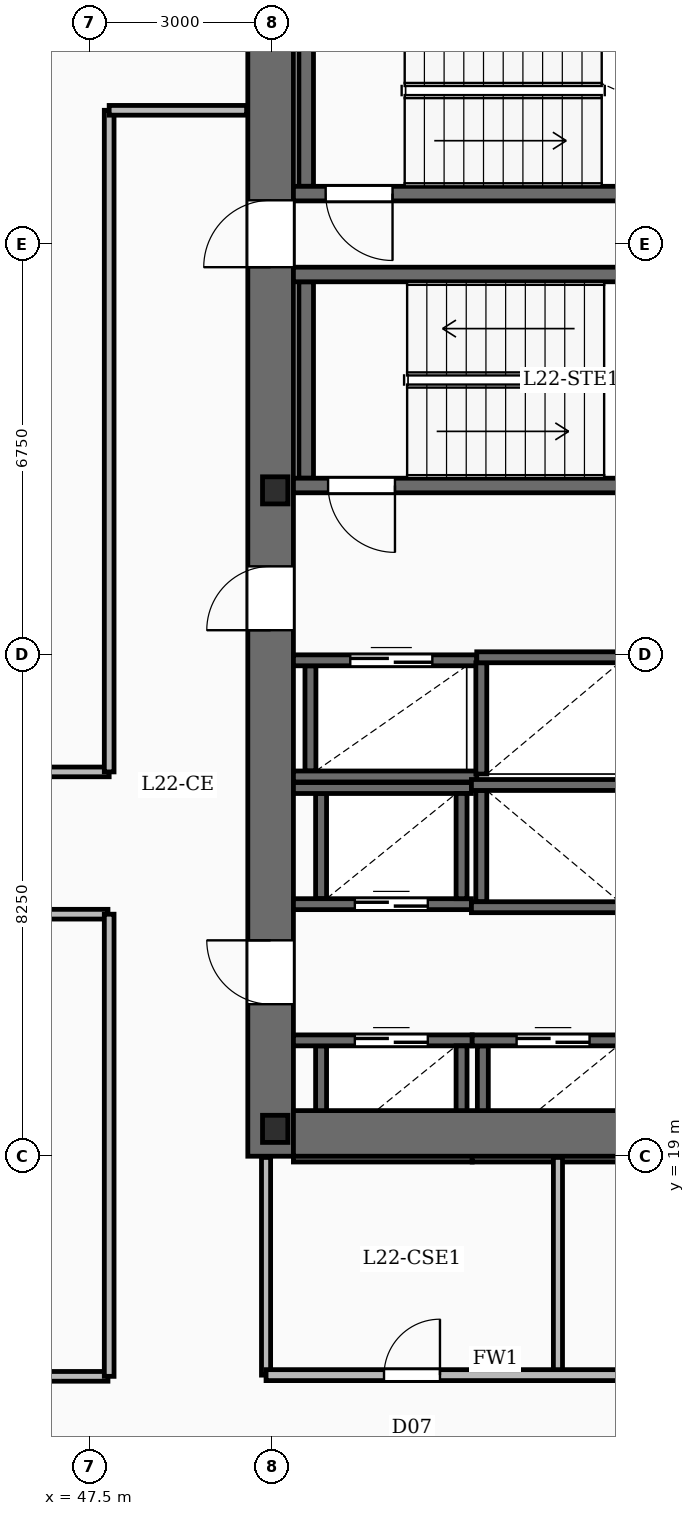
"""IFC4 building model, lengths in metres.
Left out: names, types, materials, properties, quantities, classifications, styles, units other than length and angle.
Written with IfcOpenShell. Run it as: python <this file> out.ifc"""

import sys

from ifc_helpers import new_model, si_unit, direction, frame, frame_2d, origin, origin_2d, place, context, subcontext, project, spatial, rectangle, i_section, extrude, element, fill, save


model = new_model("IFC4")
c1 = context("Model", 3, precision=1e-05, world=origin(), true_north=direction((0.0, 1.0)))
c2 = subcontext(c1, "Body", "Model", "MODEL_VIEW")
j1 = project(units=[si_unit("LENGTHUNIT", "METRE"), si_unit("PLANEANGLEUNIT", "RADIAN")], contexts=[c1])
p1 = place(None, origin())
s1 = spatial("IfcSite", under=j1, at=p1, CompositionType="ELEMENT")
p2 = place(p1, origin())
s2 = spatial("IfcBuilding", under=s1, at=p2, CompositionType="ELEMENT")
p3 = place(p2, frame((0.0, 0.0, 99.7)))
s3 = spatial("IfcBuildingStorey", under=s2, at=p3, CompositionType="ELEMENT", Elevation=99.7)
p4 = place(p3, frame((50.475, 19.0, -0.45), z_axis=(0.0, 0.0, 1.0), x_axis=(0.0, 1.0, 0.0)))
e1 = element("IfcWall", 1, at=p4, inside=s3, PredefinedType="SHEAR", context=c2, shape_type="SweptSolid", body=[
    extrude(rectangle(XDim=20.8, YDim=0.75, at=frame_2d((10.4, 0.0))), origin(), (0.0, 0.0, 1.0), 3.93),
])
p5 = place(p4, frame((2.5, 0.0, 0.45)))
e2 = element("IfcOpeningElement", 2, at=p5, cuts=e1, PredefinedType="OPENING", context=c2, shape_type="SweptSolid", body=[
    extrude(rectangle(XDim=1.05, YDim=2.15, at=frame_2d((0.525, 1.075))), frame((0.0, 0.385, 0.0), z_axis=(0.0, -1.0, 0.0), x_axis=(1.0, 0.0, 0.0)), (0.0, 0.0, 1.0), 0.77),
])
p6 = place(p4, frame((8.65, 0.0, 0.45)))
e3 = element("IfcOpeningElement", 3, at=p6, cuts=e1, PredefinedType="OPENING", context=c2, shape_type="SweptSolid", body=[
    extrude(rectangle(XDim=1.05, YDim=2.15, at=frame_2d((0.525, 1.075))), frame((0.0, 0.385, 0.0), z_axis=(0.0, -1.0, 0.0), x_axis=(1.0, 0.0, 0.0)), (0.0, 0.0, 1.0), 0.77),
])
p7 = place(p4, frame((14.62, 0.0, 0.45)))
e4 = element("IfcOpeningElement", 4, at=p7, cuts=e1, PredefinedType="OPENING", context=c2, shape_type="SweptSolid", body=[
    extrude(rectangle(XDim=1.1, YDim=2.15, at=frame_2d((0.55, 1.075))), frame((0.0, 0.385, 0.0), z_axis=(0.0, -1.0, 0.0), x_axis=(1.0, 0.0, 0.0)), (0.0, 0.0, 1.0), 0.77),
])
p8 = place(p3, frame((50.85, 19.375, -0.45), z_axis=(0.0, 0.0, 1.0), x_axis=(1.0, 0.0, 0.0)))
e5 = element("IfcWall", 5, at=p8, inside=s3, PredefinedType="SHEAR", context=c2, shape_type="SweptSolid", body=[
    extrude(rectangle(XDim=9.2, YDim=0.75, at=frame_2d((4.6, 0.0))), origin(), (0.0, 0.0, 1.0), 3.93),
])
for number, where, z_axis, x_axis in (
    (6, (50.55, 19.45, -0.45), (0.0, 0.0, 1.0), (1.0, 0.0, 0.0)),
    (7, (50.55, 29.95, -0.45), (0.0, 0.0, 1.0), (1.0, 0.0, 0.0)),
):
    element("IfcColumn", number, at=place(p3, frame(where, z_axis=z_axis, x_axis=x_axis)), inside=s3, PredefinedType="COLUMN", context=c2, shape_type="SweptSolid", body=[
        extrude(i_section(OverallWidth=0.416, OverallDepth=0.446, WebThickness=0.039, FlangeThickness=0.063, FilletRadius=0.02, at=origin_2d()), origin(), (0.0, 0.0, 1.0), 3.93),
    ])
p9 = place(p3, frame((60.05, 30.03, 0.0), z_axis=(0.0, 0.0, 1.0), x_axis=(-1.0, 0.0, 0.0)))
e8 = element("IfcWall", 8, at=p9, inside=s3, PredefinedType="SOLIDWALL", context=c2, shape_type="SweptSolid", body=[
    extrude(rectangle(XDim=9.2, YDim=0.24, at=frame_2d((4.6, 0.0))), origin(), (0.0, 0.0, 1.0), 3.48),
])
p10 = place(p9, frame((7.53, 0.0, 0.0)))
e9 = element("IfcOpeningElement", 9, at=p10, cuts=e8, PredefinedType="OPENING", context=c2, shape_type="SweptSolid", body=[
    extrude(rectangle(XDim=1.1, YDim=2.15, at=frame_2d((0.55, 1.075))), frame((0.0, 0.13, 0.0), z_axis=(0.0, -1.0, 0.0), x_axis=(1.0, 0.0, 0.0)), (0.0, 0.0, 1.0), 0.26),
])
p11 = place(p3, frame((50.85, 33.5, 0.0), z_axis=(0.0, 0.0, 1.0), x_axis=(1.0, 0.0, 0.0)))
e10 = element("IfcWall", 10, at=p11, inside=s3, PredefinedType="SOLIDWALL", context=c2, shape_type="SweptSolid", body=[
    extrude(rectangle(XDim=9.2, YDim=0.24, at=frame_2d((4.6, 0.0))), origin(), (0.0, 0.0, 1.0), 3.48),
])
p12 = place(p3, frame((51.06, 30.15, 0.0), z_axis=(0.0, 0.0, 1.0), x_axis=(0.0, 1.0, 0.0)))
e11 = element("IfcWall", 11, at=p12, inside=s3, PredefinedType="SOLIDWALL", context=c2, shape_type="SweptSolid", body=[
    extrude(rectangle(XDim=3.23, YDim=0.24, at=frame_2d((1.615, 0.0))), origin(), (0.0, 0.0, 1.0), 3.48),
])
p13 = place(p3, frame((60.05, 34.83, 0.0), z_axis=(0.0, 0.0, 1.0), x_axis=(-1.0, 0.0, 0.0)))
e12 = element("IfcWall", 12, at=p13, inside=s3, PredefinedType="SOLIDWALL", context=c2, shape_type="SweptSolid", body=[
    extrude(rectangle(XDim=9.2, YDim=0.24, at=frame_2d((4.6, 0.0))), origin(), (0.0, 0.0, 1.0), 3.48),
])
p14 = place(p13, frame((7.57, 0.0, 0.0)))
e13 = element("IfcOpeningElement", 13, at=p14, cuts=e12, PredefinedType="OPENING", context=c2, shape_type="SweptSolid", body=[
    extrude(rectangle(XDim=1.1, YDim=2.15, at=frame_2d((0.55, 1.075))), frame((0.0, 0.13, 0.0), z_axis=(0.0, -1.0, 0.0), x_axis=(1.0, 0.0, 0.0)), (0.0, 0.0, 1.0), 0.26),
])
p15 = place(p3, frame((51.06, 34.95, 0.0), z_axis=(0.0, 0.0, 1.0), x_axis=(0.0, 1.0, 0.0)))
e14 = element("IfcWall", 14, at=p15, inside=s3, PredefinedType="SOLIDWALL", context=c2, shape_type="SweptSolid", body=[
    extrude(rectangle(XDim=3.15, YDim=0.24, at=frame_2d((1.575, 0.0))), origin(), (0.0, 0.0, 1.0), 3.48),
])
p16 = place(p3, frame((50.85, 20.905, 0.0), z_axis=(0.0, 0.0, 1.0), x_axis=(1.0, 0.0, 0.0)))
e15 = element("IfcWall", 15, at=p16, inside=s3, PredefinedType="SOLIDWALL", context=c2, shape_type="SweptSolid", body=[
    extrude(rectangle(XDim=2.94, YDim=0.18, at=frame_2d((1.47, 0.0))), origin(), (0.0, 0.0, 1.0), 3.48),
])
p17 = place(p16, frame((1.01, 0.0, 0.0)))
e16 = element("IfcOpeningElement", 16, at=p17, cuts=e15, PredefinedType="OPENING", context=c2, shape_type="SweptSolid", body=[
    extrude(rectangle(XDim=1.2, YDim=2.2, at=frame_2d((0.6, 1.1))), frame((0.0, 0.1, 0.0), z_axis=(0.0, -1.0, 0.0), x_axis=(1.0, 0.0, 0.0)), (0.0, 0.0, 1.0), 0.2),
])
p18 = place(p3, frame((50.85, 18.995, 0.0), z_axis=(0.0, 0.0, 1.0), x_axis=(1.0, 0.0, 0.0)))
e17 = element("IfcWall", 17, at=p18, inside=s3, PredefinedType="SOLIDWALL", context=c2, shape_type="SweptSolid", body=[
    extrude(rectangle(XDim=2.94, YDim=0.18, at=frame_2d((1.47, 0.0))), origin(), (0.0, 0.0, 1.0), 3.48),
])
for number, where, z_axis, x_axis in (
    (18, (51.305, 19.085, 0.0), (0.0, 0.0, 1.0), (0.0, 1.0, 0.0)),
    (19, (53.615, 19.085, 0.0), (0.0, 0.0, 1.0), (0.0, 1.0, 0.0)),
):
    element("IfcWall", number, at=place(p3, frame(where, z_axis=z_axis, x_axis=x_axis)), inside=s3, PredefinedType="SOLIDWALL", context=c2, shape_type="SweptSolid", body=[
        extrude(rectangle(XDim=1.73, YDim=0.18, at=frame_2d((0.865, 0.0))), origin(), (0.0, 0.0, 1.0), 3.48),
    ])
p19 = place(p3, frame((53.79, 20.905, 0.0), z_axis=(0.0, 0.0, 1.0), x_axis=(1.0, 0.0, 0.0)))
e20 = element("IfcWall", 20, at=p19, inside=s3, PredefinedType="SOLIDWALL", context=c2, shape_type="SweptSolid", body=[
    extrude(rectangle(XDim=2.65, YDim=0.18, at=frame_2d((1.325, 0.0))), origin(), (0.0, 0.0, 1.0), 3.48),
])
p20 = place(p19, frame((0.73, 0.0, 0.0)))
e21 = element("IfcOpeningElement", 21, at=p20, cuts=e20, PredefinedType="OPENING", context=c2, shape_type="SweptSolid", body=[
    extrude(rectangle(XDim=1.2, YDim=2.2, at=frame_2d((0.6, 1.1))), frame((0.0, 0.1, 0.0), z_axis=(0.0, -1.0, 0.0), x_axis=(1.0, 0.0, 0.0)), (0.0, 0.0, 1.0), 0.2),
])
p21 = place(p3, frame((53.79, 18.995, 0.0), z_axis=(0.0, 0.0, 1.0), x_axis=(1.0, 0.0, 0.0)))
e22 = element("IfcWall", 22, at=p21, inside=s3, PredefinedType="SOLIDWALL", context=c2, shape_type="SweptSolid", body=[
    extrude(rectangle(XDim=2.65, YDim=0.18, at=frame_2d((1.325, 0.0))), origin(), (0.0, 0.0, 1.0), 3.48),
])
p22 = place(p3, frame((53.965, 19.085, 0.0), z_axis=(0.0, 0.0, 1.0), x_axis=(0.0, 1.0, 0.0)))
e23 = element("IfcWall", 23, at=p22, inside=s3, PredefinedType="SOLIDWALL", context=c2, shape_type="SweptSolid", body=[
    extrude(rectangle(XDim=1.73, YDim=0.18, at=frame_2d((0.865, 0.0))), origin(), (0.0, 0.0, 1.0), 3.48),
])
p23 = place(p3, frame((50.85, 25.055, 0.0), z_axis=(0.0, 0.0, 1.0), x_axis=(1.0, 0.0, 0.0)))
e24 = element("IfcWall", 24, at=p23, inside=s3, PredefinedType="SOLIDWALL", context=c2, shape_type="SweptSolid", body=[
    extrude(rectangle(XDim=2.927, YDim=0.18, at=frame_2d((1.464, 0.0))), origin(), (0.0, 0.0, 1.0), 3.48),
])
p24 = place(p3, frame((50.85, 23.145, 0.0), z_axis=(0.0, 0.0, 1.0), x_axis=(1.0, 0.0, 0.0)))
e25 = element("IfcWall", 25, at=p24, inside=s3, PredefinedType="SOLIDWALL", context=c2, shape_type="SweptSolid", body=[
    extrude(rectangle(XDim=2.927, YDim=0.18, at=frame_2d((1.464, 0.0))), origin(), (0.0, 0.0, 1.0), 3.48),
])
p25 = place(p24, frame((1.01, 0.0, 0.0)))
e26 = element("IfcOpeningElement", 26, at=p25, cuts=e25, PredefinedType="OPENING", context=c2, shape_type="SweptSolid", body=[
    extrude(rectangle(XDim=1.2, YDim=2.2, at=frame_2d((0.6, 1.1))), frame((0.0, 0.1, 0.0), z_axis=(0.0, -1.0, 0.0), x_axis=(1.0, 0.0, 0.0)), (0.0, 0.0, 1.0), 0.2),
])
for number, where, z_axis, x_axis in (
    (27, (51.305, 23.235, 0.0), (0.0, 0.0, 1.0), (0.0, 1.0, 0.0)),
    (28, (53.615, 23.235, 0.0), (0.0, 0.0, 1.0), (0.0, 1.0, 0.0)),
):
    element("IfcWall", number, at=place(p3, frame(where, z_axis=z_axis, x_axis=x_axis)), inside=s3, PredefinedType="SOLIDWALL", context=c2, shape_type="SweptSolid", body=[
        extrude(rectangle(XDim=1.73, YDim=0.18, at=frame_2d((0.865, 0.0))), origin(), (0.0, 0.0, 1.0), 3.48),
    ])
for number, where, z_axis, x_axis in (
    (29, (53.778, 25.105, 0.0), (0.0, 0.0, 1.0), (1.0, 0.0, 0.0)),
    (30, (53.778, 23.095, 0.0), (0.0, 0.0, 1.0), (1.0, 0.0, 0.0)),
):
    element("IfcWall", number, at=place(p3, frame(where, z_axis=z_axis, x_axis=x_axis)), inside=s3, PredefinedType="SOLIDWALL", context=c2, shape_type="SweptSolid", body=[
        extrude(rectangle(XDim=2.662, YDim=0.18, at=frame_2d((1.331, 0.0))), origin(), (0.0, 0.0, 1.0), 3.48),
    ])
p26 = place(p3, frame((53.94, 23.185, 0.0), z_axis=(0.0, 0.0, 1.0), x_axis=(0.0, 1.0, 0.0)))
e31 = element("IfcWall", 31, at=p26, inside=s3, PredefinedType="SOLIDWALL", context=c2, shape_type="SweptSolid", body=[
    extrude(rectangle(XDim=1.83, YDim=0.18, at=frame_2d((0.915, 0.0))), origin(), (0.0, 0.0, 1.0), 3.48),
])
p27 = place(p3, frame((53.865, 27.205, 0.0), z_axis=(0.0, 0.0, 1.0), x_axis=(1.0, 0.0, 0.0)))
e32 = element("IfcWall", 32, at=p27, inside=s3, PredefinedType="SOLIDWALL", context=c2, shape_type="SweptSolid", body=[
    extrude(rectangle(XDim=2.575, YDim=0.18, at=frame_2d((1.288, 0.0))), origin(), (0.0, 0.0, 1.0), 3.48),
])
p28 = place(p3, frame((53.94, 25.285, 0.0), z_axis=(0.0, 0.0, 1.0), x_axis=(0.0, 1.0, 0.0)))
e33 = element("IfcWall", 33, at=p28, inside=s3, PredefinedType="SOLIDWALL", context=c2, shape_type="SweptSolid", body=[
    extrude(rectangle(XDim=1.83, YDim=0.18, at=frame_2d((0.915, 0.0))), origin(), (0.0, 0.0, 1.0), 3.48),
])
p29 = place(p3, frame((50.85, 27.155, 0.0), z_axis=(0.0, 0.0, 1.0), x_axis=(1.0, 0.0, 0.0)))
e34 = element("IfcWall", 34, at=p29, inside=s3, PredefinedType="SOLIDWALL", context=c2, shape_type="SweptSolid", body=[
    extrude(rectangle(XDim=3.015, YDim=0.18, at=frame_2d((1.507, 0.0))), origin(), (0.0, 0.0, 1.0), 3.48),
])
p30 = place(p29, frame((0.935, 0.0, 0.0)))
e35 = element("IfcOpeningElement", 35, at=p30, cuts=e34, PredefinedType="OPENING", context=c2, shape_type="SweptSolid", body=[
    extrude(rectangle(XDim=1.35, YDim=2.3, at=frame_2d((0.675, 1.15))), frame((0.0, 0.1, 0.0), z_axis=(0.0, -1.0, 0.0), x_axis=(1.0, 0.0, 0.0)), (0.0, 0.0, 1.0), 0.2),
])
p31 = place(p3, frame((50.85, 25.245, 0.0), z_axis=(0.0, 0.0, 1.0), x_axis=(1.0, 0.0, 0.0)))
e36 = element("IfcWall", 36, at=p31, inside=s3, PredefinedType="SOLIDWALL", context=c2, shape_type="SweptSolid", body=[
    extrude(rectangle(XDim=3.015, YDim=0.18, at=frame_2d((1.507, 0.0))), origin(), (0.0, 0.0, 1.0), 3.48),
])
p32 = place(p3, frame((51.13, 25.335, 0.0), z_axis=(0.0, 0.0, 1.0), x_axis=(0.0, 1.0, 0.0)))
e37 = element("IfcWall", 37, at=p32, inside=s3, PredefinedType="SOLIDWALL", context=c2, shape_type="SweptSolid", body=[
    extrude(rectangle(XDim=1.73, YDim=0.18, at=frame_2d((0.865, 0.0))), origin(), (0.0, 0.0, 1.0), 3.48),
])
p33 = place(p3, frame((55.2, 15.4, 0.0), z_axis=(0.0, 0.0, 1.0), x_axis=(0.0, 1.0, 0.0)))
e38 = element("IfcWall", 38, at=p33, inside=s3, PredefinedType="PARTITIONING", context=c2, shape_type="SweptSolid", body=[
    extrude(rectangle(XDim=3.58, YDim=0.15, at=frame_2d((1.79, 0.0))), origin(), (0.0, 0.0, 1.0), 2.54),
])
p34 = place(p3, frame((50.4, 15.4, 0.0), z_axis=(0.0, 0.0, 1.0), x_axis=(1.0, 0.0, 0.0)))
e39 = element("IfcWall", 39, at=p34, inside=s3, PredefinedType="SOLIDWALL", context=c2, shape_type="SweptSolid", body=[
    extrude(rectangle(XDim=10.0, YDim=0.18, at=frame_2d((5.0, 0.0))), origin(), (0.0, 0.0, 1.0), 2.54),
])
p35 = place(p34, frame((1.94, 0.0, 0.0)))
e40 = element("IfcOpeningElement", 40, at=p35, cuts=e39, PredefinedType="OPENING", context=c2, shape_type="SweptSolid", body=[
    extrude(rectangle(XDim=0.92, YDim=2.1, at=frame_2d((0.46, 1.05))), frame((0.0, 0.1, 0.0), z_axis=(0.0, -1.0, 0.0), x_axis=(1.0, 0.0, 0.0)), (0.0, 0.0, 1.0), 0.2),
])
p36 = place(p34, frame((6.97, 0.0, 0.0)))
e41 = element("IfcOpeningElement", 41, at=p36, cuts=e39, PredefinedType="OPENING", context=c2, shape_type="SweptSolid", body=[
    extrude(rectangle(XDim=0.86, YDim=2.05, at=frame_2d((0.43, 1.025))), frame((0.0, 0.1, 0.0), z_axis=(0.0, -1.0, 0.0), x_axis=(1.0, 0.0, 0.0)), (0.0, 0.0, 1.0), 0.2),
])
p37 = place(p3, frame((50.4, 15.4, 0.0), z_axis=(0.0, 0.0, 1.0), x_axis=(0.0, 1.0, 0.0)))
e42 = element("IfcWall", 42, at=p37, inside=s3, PredefinedType="PARTITIONING", context=c2, shape_type="SweptSolid", body=[
    extrude(rectangle(XDim=3.58, YDim=0.15, at=frame_2d((1.79, 0.0))), origin(), (0.0, 0.0, 1.0), 2.54),
])
p38 = place(p3, frame((27.08, 25.32, 0.0), z_axis=(0.0, 0.0, 1.0), x_axis=(1.0, 0.0, 0.0)))
e43 = element("IfcWall", 43, at=p38, inside=s3, PredefinedType="PARTITIONING", context=c2, shape_type="SweptSolid", body=[
    extrude(rectangle(XDim=20.74, YDim=0.16, at=frame_2d((10.37, 0.0))), origin(), (0.0, 0.0, 1.0), 2.54),
])
p39 = place(p38, frame((0.995, 0.0, 0.0)))
e44 = element("IfcOpeningElement", 44, at=p39, cuts=e43, PredefinedType="OPENING", context=c2, shape_type="SweptSolid", body=[
    extrude(rectangle(XDim=0.95, YDim=2.15, at=frame_2d((0.475, 1.075))), frame((0.0, 0.09, 0.0), z_axis=(0.0, -1.0, 0.0), x_axis=(1.0, 0.0, 0.0)), (0.0, 0.0, 1.0), 0.18),
])
p40 = place(p38, frame((5.445, 0.0, 0.0)))
e45 = element("IfcOpeningElement", 45, at=p40, cuts=e43, PredefinedType="OPENING", context=c2, shape_type="SweptSolid", body=[
    extrude(rectangle(XDim=0.95, YDim=2.15, at=frame_2d((0.475, 1.075))), frame((0.0, 0.09, 0.0), z_axis=(0.0, -1.0, 0.0), x_axis=(1.0, 0.0, 0.0)), (0.0, 0.0, 1.0), 0.18),
])
p41 = place(p38, frame((11.695, 0.0, 0.0)))
e46 = element("IfcOpeningElement", 46, at=p41, cuts=e43, PredefinedType="OPENING", context=c2, shape_type="SweptSolid", body=[
    extrude(rectangle(XDim=0.95, YDim=2.15, at=frame_2d((0.475, 1.075))), frame((0.0, 0.09, 0.0), z_axis=(0.0, -1.0, 0.0), x_axis=(1.0, 0.0, 0.0)), (0.0, 0.0, 1.0), 0.18),
])
p42 = place(p38, frame((18.295, 0.0, 0.0)))
e47 = element("IfcOpeningElement", 47, at=p42, cuts=e43, PredefinedType="OPENING", context=c2, shape_type="SweptSolid", body=[
    extrude(rectangle(XDim=0.95, YDim=2.15, at=frame_2d((0.475, 1.075))), frame((0.0, 0.09, 0.0), z_axis=(0.0, -1.0, 0.0), x_axis=(1.0, 0.0, 0.0)), (0.0, 0.0, 1.0), 0.18),
])
p43 = place(p3, frame((43.44, 22.98, 0.0), z_axis=(0.0, 0.0, 1.0), x_axis=(1.0, 0.0, 0.0)))
e48 = element("IfcWall", 48, at=p43, inside=s3, PredefinedType="PARTITIONING", context=c2, shape_type="SweptSolid", body=[
    extrude(rectangle(XDim=4.36, YDim=0.16, at=frame_2d((2.18, 0.0))), origin(), (0.0, 0.0, 1.0), 2.54),
])
p44 = place(p43, frame((1.935, 0.0, 0.0)))
e49 = element("IfcOpeningElement", 49, at=p44, cuts=e48, PredefinedType="OPENING", context=c2, shape_type="SweptSolid", body=[
    extrude(rectangle(XDim=0.95, YDim=2.15, at=frame_2d((0.475, 1.075))), frame((0.0, 0.09, 0.0), z_axis=(0.0, -1.0, 0.0), x_axis=(1.0, 0.0, 0.0)), (0.0, 0.0, 1.0), 0.18),
])
p45 = place(p3, frame((43.44, 15.38, 0.0), z_axis=(0.0, 0.0, 1.0), x_axis=(1.0, 0.0, 0.0)))
e50 = element("IfcWall", 50, at=p45, inside=s3, PredefinedType="PARTITIONING", context=c2, shape_type="SweptSolid", body=[
    extrude(rectangle(XDim=4.36, YDim=0.16, at=frame_2d((2.18, 0.0))), origin(), (0.0, 0.0, 1.0), 2.54),
])
p46 = place(p3, frame((47.82, 15.38, 0.0), z_axis=(0.0, 0.0, 1.0), x_axis=(0.0, 1.0, 0.0)))
e51 = element("IfcWall", 51, at=p46, inside=s3, PredefinedType="PARTITIONING", context=c2, shape_type="SweptSolid", body=[
    extrude(rectangle(XDim=7.6, YDim=0.16, at=frame_2d((3.8, 0.0))), origin(), (0.0, 0.0, 1.0), 2.54),
])
p47 = place(p3, frame((47.82, 25.32, 0.0), z_axis=(0.0, 0.0, 1.0), x_axis=(0.0, 1.0, 0.0)))
e52 = element("IfcWall", 52, at=p47, inside=s3, PredefinedType="PARTITIONING", context=c2, shape_type="SweptSolid", body=[
    extrude(rectangle(XDim=10.88, YDim=0.16, at=frame_2d((5.44, 0.0))), origin(), (0.0, 0.0, 1.0), 2.54),
])
p48 = place(p3, frame((47.82, 36.2, 0.0), z_axis=(0.0, 0.0, 1.0), x_axis=(1.0, 0.0, 0.0)))
e53 = element("IfcWall", 53, at=p48, inside=s3, PredefinedType="PARTITIONING", context=c2, shape_type="SweptSolid", body=[
    extrude(rectangle(XDim=2.26, YDim=0.16, at=frame_2d((1.13, 0.0))), origin(), (0.0, 0.0, 1.0), 2.54),
])
p49 = place(p5, origin())
e54 = element("IfcDoor", 54, at=p49, inside=s3, OperationType="SINGLE_SWING_RIGHT", PredefinedType="DOOR", context=c2, shape_type="SweptSolid", body=[
    extrude(rectangle(XDim=1.05, YDim=2.15, at=frame_2d((0.525, 1.075))), frame((0.0, 0.025, 0.0), z_axis=(0.0, -1.0, 0.0), x_axis=(1.0, 0.0, 0.0)), (0.0, 0.0, 1.0), 0.05),
])
fill(e2, e54)
p50 = place(p6, origin())
e55 = element("IfcDoor", 55, at=p50, inside=s3, OperationType="SINGLE_SWING_LEFT", PredefinedType="DOOR", context=c2, shape_type="SweptSolid", body=[
    extrude(rectangle(XDim=1.05, YDim=2.15, at=frame_2d((0.525, 1.075))), frame((0.0, 0.025, 0.0), z_axis=(0.0, -1.0, 0.0), x_axis=(1.0, 0.0, 0.0)), (0.0, 0.0, 1.0), 0.05),
])
fill(e3, e55)
p51 = place(p7, origin())
e56 = element("IfcDoor", 56, at=p51, inside=s3, OperationType="SINGLE_SWING_LEFT", PredefinedType="DOOR", context=c2, shape_type="SweptSolid", body=[
    extrude(rectangle(XDim=1.1, YDim=2.15, at=frame_2d((0.55, 1.075))), frame((0.0, 0.025, 0.0), z_axis=(0.0, -1.0, 0.0), x_axis=(1.0, 0.0, 0.0)), (0.0, 0.0, 1.0), 0.05),
])
fill(e4, e56)
p52 = place(p10, origin())
e57 = element("IfcDoor", 57, at=p52, inside=s3, OperationType="SINGLE_SWING_LEFT", PredefinedType="DOOR", context=c2, shape_type="SweptSolid", body=[
    extrude(rectangle(XDim=1.1, YDim=2.15, at=frame_2d((0.55, 1.075))), frame((0.0, 0.025, 0.0), z_axis=(0.0, -1.0, 0.0), x_axis=(1.0, 0.0, 0.0)), (0.0, 0.0, 1.0), 0.05),
])
fill(e9, e57)
p53 = place(p14, origin())
e58 = element("IfcDoor", 58, at=p53, inside=s3, OperationType="SINGLE_SWING_LEFT", PredefinedType="DOOR", context=c2, shape_type="SweptSolid", body=[
    extrude(rectangle(XDim=1.1, YDim=2.15, at=frame_2d((0.55, 1.075))), frame((0.0, 0.025, 0.0), z_axis=(0.0, -1.0, 0.0), x_axis=(1.0, 0.0, 0.0)), (0.0, 0.0, 1.0), 0.05),
])
fill(e13, e58)
p54 = place(p17, origin())
e59 = element("IfcDoor", 59, at=p54, inside=s3, OperationType="DOUBLE_DOOR_SLIDING", PredefinedType="DOOR", context=c2, shape_type="SweptSolid", body=[
    extrude(rectangle(XDim=1.2, YDim=2.2, at=frame_2d((0.6, 1.1))), frame((0.0, 0.025, 0.0), z_axis=(0.0, -1.0, 0.0), x_axis=(1.0, 0.0, 0.0)), (0.0, 0.0, 1.0), 0.05),
])
fill(e16, e59)
p55 = place(p20, origin())
e60 = element("IfcDoor", 60, at=p55, inside=s3, OperationType="DOUBLE_DOOR_SLIDING", PredefinedType="DOOR", context=c2, shape_type="SweptSolid", body=[
    extrude(rectangle(XDim=1.2, YDim=2.2, at=frame_2d((0.6, 1.1))), frame((0.0, 0.025, 0.0), z_axis=(0.0, -1.0, 0.0), x_axis=(1.0, 0.0, 0.0)), (0.0, 0.0, 1.0), 0.05),
])
fill(e21, e60)
p56 = place(p25, origin())
e61 = element("IfcDoor", 61, at=p56, inside=s3, OperationType="DOUBLE_DOOR_SLIDING", PredefinedType="DOOR", context=c2, shape_type="SweptSolid", body=[
    extrude(rectangle(XDim=1.2, YDim=2.2, at=frame_2d((0.6, 1.1))), frame((0.0, 0.025, 0.0), z_axis=(0.0, -1.0, 0.0), x_axis=(1.0, 0.0, 0.0)), (0.0, 0.0, 1.0), 0.05),
])
fill(e26, e61)
p57 = place(p30, origin())
e62 = element("IfcDoor", 62, at=p57, inside=s3, OperationType="DOUBLE_DOOR_SLIDING", PredefinedType="DOOR", context=c2, shape_type="SweptSolid", body=[
    extrude(rectangle(XDim=1.35, YDim=2.3, at=frame_2d((0.675, 1.15))), frame((0.0, 0.025, 0.0), z_axis=(0.0, -1.0, 0.0), x_axis=(1.0, 0.0, 0.0)), (0.0, 0.0, 1.0), 0.05),
])
fill(e35, e62)
p58 = place(p35, origin())
e63 = element("IfcDoor", 63, at=p58, inside=s3, OperationType="SINGLE_SWING_RIGHT", PredefinedType="DOOR", context=c2, shape_type="SweptSolid", body=[
    extrude(rectangle(XDim=0.92, YDim=2.1, at=frame_2d((0.46, 1.05))), frame((0.0, 0.025, 0.0), z_axis=(0.0, -1.0, 0.0), x_axis=(1.0, 0.0, 0.0)), (0.0, 0.0, 1.0), 0.05),
])
fill(e40, e63)
save(model, sys.argv[1])
